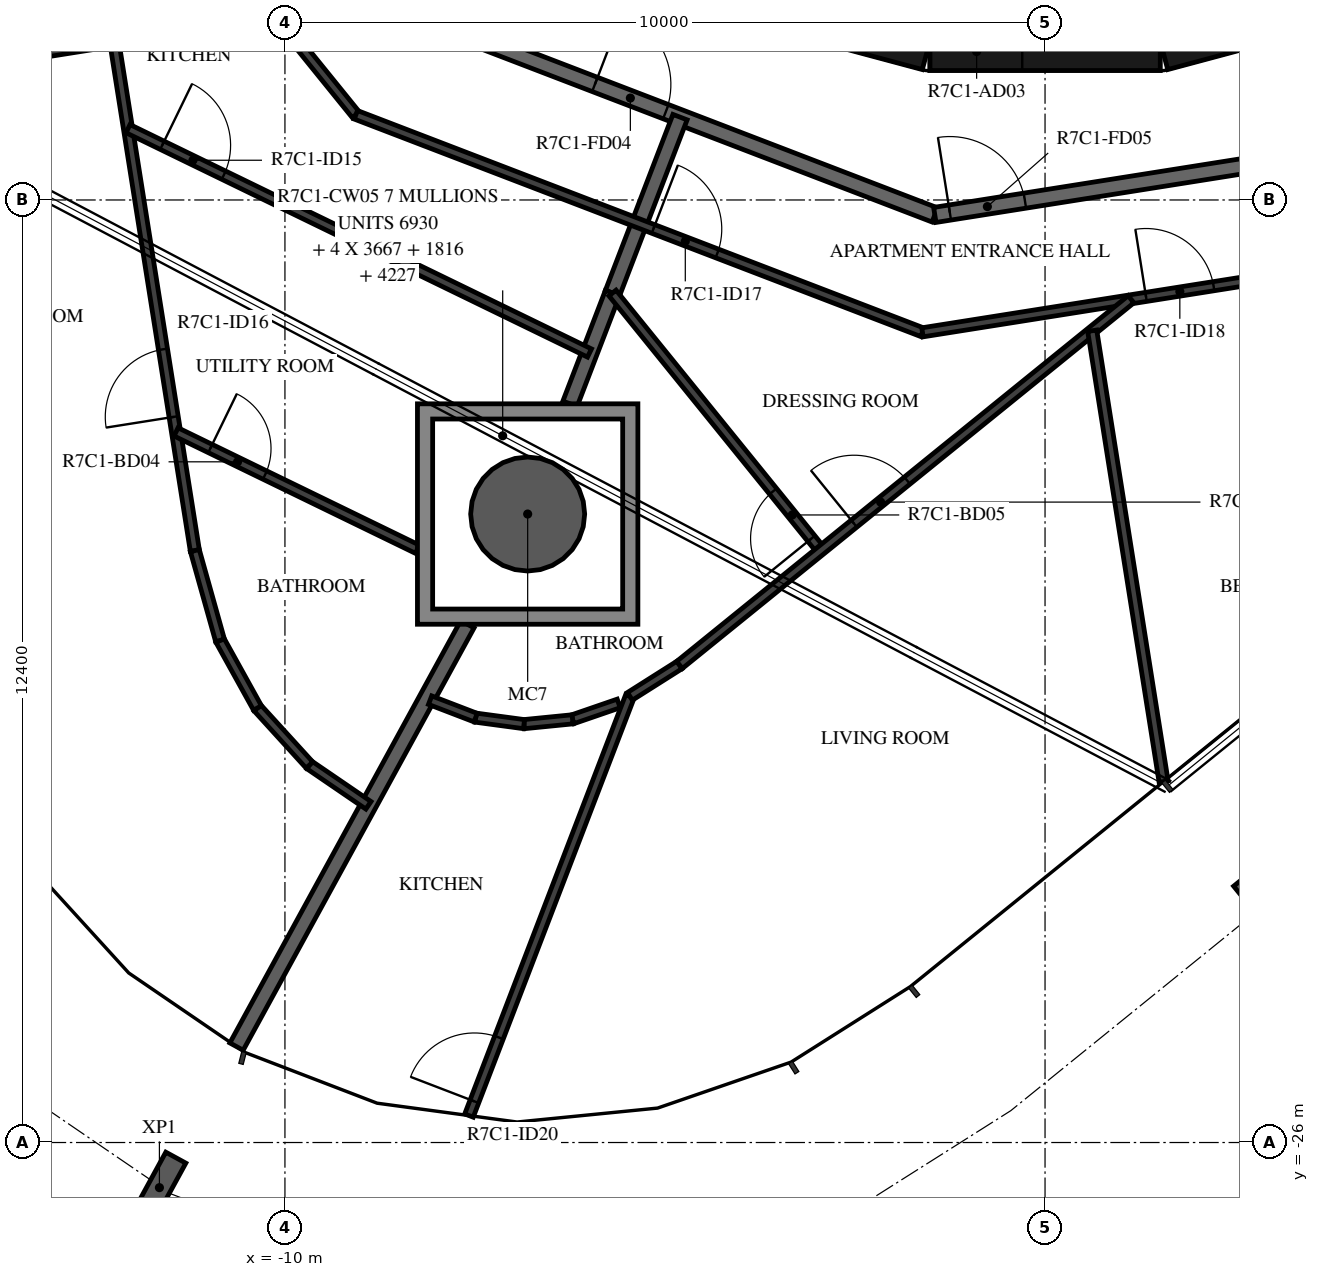
"""IFC4 building model, lengths in metres.
Left out: names, types, materials, properties, quantities, classifications, styles, units other than length and angle.
Written with IfcOpenShell. Run it as: python <this file> out.ifc"""

import sys

from ifc_helpers import new_model, si_unit, direction, frame, frame_2d, origin, origin_2d, place, context, subcontext, project, spatial, polyline, rectangle, hollow_circle, i_section, outline, extrude, element, fill, save


model = new_model("IFC4")
c1 = context("Model", 3, precision=1e-05, world=origin(), true_north=direction((0.0, 1.0)))
c2 = subcontext(c1, "Body", "Model", "MODEL_VIEW")
j1 = project(units=[si_unit("LENGTHUNIT", "METRE"), si_unit("PLANEANGLEUNIT", "RADIAN")], contexts=[c1])
p1 = place(None, origin())
s1 = spatial("IfcSite", under=j1, at=p1, CompositionType="ELEMENT")
p2 = place(p1, origin())
s2 = spatial("IfcBuilding", under=s1, at=p2, CompositionType="ELEMENT")
p3 = place(p2, frame((0.0, 0.0, 287.9)))
s3 = spatial("IfcBuildingStorey", under=s2, at=p3, CompositionType="ELEMENT", Elevation=287.9)
p4 = place(p3, frame((-6.807, -17.732, -0.38), z_axis=(0.0, 0.0, 1.0), x_axis=(1.0, 0.0, 0.0)))
e1 = element("IfcColumn", 1, at=p4, inside=s3, PredefinedType="COLUMN", context=c2, shape_type="SweptSolid", body=[
    extrude(hollow_circle(Radius=0.75, WallThickness=0.035, at=origin_2d()), origin(), (0.0, 0.0, 1.0), 2.616),
])
for number, where, z_axis, x_axis in (
    (2, (-11.652, -26.594, -0.38), (0.0, 0.0, 1.0), (-0.877, 0.48, 0.0)),
    (3, (2.881, -22.883, -0.38), (0.0, 0.0, 1.0), (-0.777, -0.629, 0.0)),
):
    element("IfcColumn", number, at=place(p3, frame(where, z_axis=z_axis, x_axis=x_axis)), inside=s3, PredefinedType="COLUMN", context=c2, shape_type="SweptSolid", body=[
        extrude(i_section(OverallWidth=0.3, OverallDepth=0.9, WebThickness=0.019, FlangeThickness=0.035, FilletRadius=0.03, at=origin_2d()), origin(), (0.0, 0.0, 1.0), 2.616),
    ])
for number, where, z_axis, x_axis in (
    (4, (1.55, -11.643, 0.0), (0.0, 0.0, 1.0), (0.966, 0.259, 0.0)),
    (5, (-4.479, -10.858, 0.0), (0.0, 0.0, 1.0), (0.966, -0.259, 0.0)),
):
    element("IfcWall", number, at=place(p3, frame(where, z_axis=z_axis, x_axis=x_axis)), inside=s3, PredefinedType="SHEAR", context=c2, shape_type="SweptSolid", body=[
        extrude(rectangle(XDim=3.033, YDim=0.5, at=frame_2d((1.516, 0.0))), origin(), (0.0, 0.0, 1.0), 3.05),
    ])
p5 = place(p3, frame((-1.516, -11.647, 0.0), z_axis=(0.0, 0.0, 1.0), x_axis=(1.0, 0.0, 0.0)))
e6 = element("IfcWall", 6, at=p5, inside=s3, PredefinedType="SHEAR", context=c2, shape_type="SweptSolid", body=[
    extrude(rectangle(XDim=3.033, YDim=0.5, at=frame_2d((1.516, 0.0))), origin(), (0.0, 0.0, 1.0), 3.05),
])
p6 = place(p5, frame((0.016, 0.0, 0.0)))
e7 = element("IfcOpeningElement", 7, at=p6, cuts=e6, PredefinedType="OPENING", context=c2, shape_type="SweptSolid", body=[
    extrude(rectangle(XDim=1.2, YDim=2.1, at=frame_2d((0.6, 1.05))), frame((0.0, 0.26, 0.0), z_axis=(0.0, -1.0, 0.0), x_axis=(1.0, 0.0, 0.0)), (0.0, 0.0, 1.0), 0.52),
])
p7 = place(p3, frame((-8.154, -11.223, 0.0), z_axis=(0.0, 0.0, 1.0), x_axis=(0.93359073609, -0.358341090983, 0.0)))
e8 = element("IfcWall", 8, at=p7, inside=s3, PredefinedType="STANDARD", context=c2, shape_type="SweptSolid", body=[
    extrude(rectangle(XDim=7.181, YDim=0.2, at=frame_2d((3.59, 0.0))), origin(), (0.0, 0.0, 1.0), 3.05),
])
p8 = place(p7, frame((2.39, 0.0, 0.0)))
e9 = element("IfcOpeningElement", 9, at=p8, cuts=e8, PredefinedType="OPENING", context=c2, shape_type="SweptSolid", body=[
    extrude(rectangle(XDim=1.0, YDim=2.1, at=frame_2d((0.5, 1.05))), frame((0.0, 0.11, 0.0), z_axis=(0.0, -1.0, 0.0), x_axis=(1.0, 0.0, 0.0)), (0.0, 0.0, 1.0), 0.22),
])
p9 = place(p3, frame((-1.45, -13.797, 0.0), z_axis=(0.0, 0.0, 1.0), x_axis=(0.987690361611, 0.156421704315, 0.0)))
e10 = element("IfcWall", 10, at=p9, inside=s3, PredefinedType="STANDARD", context=c2, shape_type="SweptSolid", body=[
    extrude(rectangle(XDim=7.181, YDim=0.2, at=frame_2d((3.591, 0.0))), origin(), (0.0, 0.0, 1.0), 3.05),
])
p10 = place(p9, frame((0.2, 0.0, 0.0)))
e11 = element("IfcOpeningElement", 11, at=p10, cuts=e10, PredefinedType="OPENING", context=c2, shape_type="SweptSolid", body=[
    extrude(rectangle(XDim=1.0, YDim=2.1, at=frame_2d((0.5, 1.05))), frame((0.0, 0.11, 0.0), z_axis=(0.0, -1.0, 0.0), x_axis=(1.0, 0.0, 0.0)), (0.0, 0.0, 1.0), 0.22),
])
p11 = place(p3, frame((-5.69, -14.824, 0.0), z_axis=(0.0, 0.0, 1.0), x_axis=(0.358345342952, 0.933589104041, 0.0)))
e12 = element("IfcWall", 12, at=p11, inside=s3, PredefinedType="STANDARD", context=c2, shape_type="SweptSolid", body=[
    extrude(rectangle(XDim=2.479, YDim=0.2, at=frame_2d((1.239, 0.0))), origin(), (0.0, 0.0, 1.0), 3.05),
])
p12 = place(p3, frame((-6.25, -16.282, 0.0), z_axis=(0.0, 0.0, 1.0), x_axis=(0.358360842469, 0.933583154617, 0.0)))
e13 = element("IfcWall", 13, at=p12, inside=s3, PredefinedType="STANDARD", context=c2, shape_type="SweptSolid", body=[
    extrude(rectangle(XDim=1.562, YDim=0.2, at=frame_2d((0.781, 0.0))), origin(), (0.0, 0.0, 1.0), 3.05),
])
p13 = place(p3, frame((-10.637, -24.738, 0.0), z_axis=(0.0, 0.0, 1.0), x_axis=(0.479683887596, 0.877441375808, 0.0)))
e14 = element("IfcWall", 14, at=p13, inside=s3, PredefinedType="STANDARD", context=c2, shape_type="SweptSolid", body=[
    extrude(rectangle(XDim=6.333, YDim=0.2, at=frame_2d((3.166, 0.0))), origin(), (0.0, 0.0, 1.0), 3.05),
])
p14 = place(p3, frame((-11.795, -9.111, 0.0), z_axis=(0.0, 0.0, 1.0), x_axis=(0.62936834401, -0.777107127466, 0.0)))
e15 = element("IfcWall", 15, at=p14, inside=s3, PredefinedType="PARTITIONING", context=c2, shape_type="SweptSolid", body=[
    extrude(rectangle(XDim=4.334, YDim=0.12, at=frame_2d((2.167, 0.0))), origin(), (0.0, 0.0, 1.0), 3.05),
])
p15 = place(p14, frame((0.2, 0.0, 0.0)))
e16 = element("IfcOpeningElement", 16, at=p15, cuts=e15, PredefinedType="OPENING", context=c2, shape_type="SweptSolid", body=[
    extrude(rectangle(XDim=0.9, YDim=2.1, at=frame_2d((0.45, 1.05))), frame((0.0, 0.07, 0.0), z_axis=(0.0, -1.0, 0.0), x_axis=(1.0, 0.0, 0.0)), (0.0, 0.0, 1.0), 0.14),
])
p16 = place(p3, frame((-9.067, -12.479, 0.0), z_axis=(0.0, 0.0, 1.0), x_axis=(0.933579449035, -0.358370495911, 0.0)))
e17 = element("IfcWall", 17, at=p16, inside=s3, PredefinedType="PARTITIONING", context=c2, shape_type="SweptSolid", body=[
    extrude(rectangle(XDim=7.985, YDim=0.12, at=frame_2d((3.992, 0.0))), origin(), (0.0, 0.0, 1.0), 3.05),
])
p17 = place(p16, frame((4.192, 0.0, 0.0)))
e18 = element("IfcOpeningElement", 18, at=p17, cuts=e17, PredefinedType="OPENING", context=c2, shape_type="SweptSolid", body=[
    extrude(rectangle(XDim=0.9, YDim=2.1, at=frame_2d((0.45, 1.05))), frame((0.0, 0.07, 0.0), z_axis=(0.0, -1.0, 0.0), x_axis=(1.0, 0.0, 0.0)), (0.0, 0.0, 1.0), 0.14),
])
p18 = place(p3, frame((-11.185, -18.213, 0.0), z_axis=(0.0, 0.0, 1.0), x_axis=(-0.15642108221, 0.987690460134, 0.0)))
e19 = element("IfcWall", 19, at=p18, inside=s3, PredefinedType="PARTITIONING", context=c2, shape_type="SweptSolid", body=[
    extrude(rectangle(XDim=9.132, YDim=0.12, at=frame_2d((4.566, 0.0))), origin(), (0.0, 0.0, 1.0), 3.05),
])
p19 = place(p18, frame((1.781, 0.0, 0.0)))
e20 = element("IfcOpeningElement", 20, at=p19, cuts=e19, PredefinedType="OPENING", context=c2, shape_type="SweptSolid", body=[
    extrude(rectangle(XDim=0.9, YDim=2.1, at=frame_2d((0.45, 1.05))), frame((0.0, 0.07, 0.0), z_axis=(0.0, -1.0, 0.0), x_axis=(1.0, 0.0, 0.0)), (0.0, 0.0, 1.0), 0.14),
])
p20 = place(p3, frame((-15.802, -12.08, 0.0), z_axis=(0.0, 0.0, 1.0), x_axis=(0.987685312069, 0.156453585206, 0.0)))
e21 = element("IfcWall", 21, at=p20, inside=s3, PredefinedType="PARTITIONING", context=c2, shape_type="SweptSolid", body=[
    extrude(rectangle(XDim=3.6, YDim=0.12, at=frame_2d((1.8, 0.0))), origin(), (0.0, 0.0, 1.0), 3.05),
])
p21 = place(p3, frame((-12.064, -12.662, 0.0), z_axis=(0.0, 0.0, 1.0), x_axis=(0.899383852228, -0.437159794985, 0.0)))
e22 = element("IfcWall", 22, at=p21, inside=s3, PredefinedType="PARTITIONING", context=c2, shape_type="SweptSolid", body=[
    extrude(rectangle(XDim=6.75, YDim=0.12, at=frame_2d((3.375, 0.0))), origin(), (0.0, 0.0, 1.0), 3.05),
])
p22 = place(p21, frame((0.5, 0.0, 0.0)))
e23 = element("IfcOpeningElement", 23, at=p22, cuts=e22, PredefinedType="OPENING", context=c2, shape_type="SweptSolid", body=[
    extrude(rectangle(XDim=0.9, YDim=2.1, at=frame_2d((0.45, 1.05))), frame((0.0, 0.07, 0.0), z_axis=(0.0, -1.0, 0.0), x_axis=(1.0, 0.0, 0.0)), (0.0, 0.0, 1.0), 0.14),
])
p23 = place(p3, frame((-8.902, -21.564, 0.0), z_axis=(0.0, 0.0, 1.0), x_axis=(-0.825676933813, 0.56414324508, 0.0)))
e24 = element("IfcWall", 24, at=p23, inside=s3, PredefinedType="PARTITIONING", context=c2, shape_type="SweptSolid", body=[
    extrude(rectangle(XDim=0.939, YDim=0.12, at=frame_2d((0.47, 0.0))), origin(), (0.0, 0.0, 1.0), 3.05),
])
for number, where, z_axis, x_axis in (
    (25, (-9.677, -21.034, 0.0), (0.0, 0.0, 1.0), (-0.674, 0.739, 0.0)),
    (26, (-10.361, -20.283, 0.0), (0.0, 0.0, 1.0), (-0.485, 0.875, 0.0)),
):
    element("IfcWall", number, at=place(p3, frame(where, z_axis=z_axis, x_axis=x_axis)), inside=s3, PredefinedType="PARTITIONING", context=c2, shape_type="SweptSolid", body=[
        extrude(rectangle(XDim=1.016, YDim=0.12, at=frame_2d((0.508, 0.0))), origin(), (0.0, 0.0, 1.0), 3.05),
    ])
p24 = place(p3, frame((-10.854, -19.394, 0.0), z_axis=(0.0, 0.0, 1.0), x_axis=(-0.27001369034, 0.96285648309, 0.0)))
e27 = element("IfcWall", 27, at=p24, inside=s3, PredefinedType="PARTITIONING", context=c2, shape_type="SweptSolid", body=[
    extrude(rectangle(XDim=1.227, YDim=0.12, at=frame_2d((0.614, 0.0))), origin(), (0.0, 0.0, 1.0), 3.05),
])
p25 = place(p3, frame((-11.433, -16.651, 0.0), z_axis=(0.0, 0.0, 1.0), x_axis=(0.899390128806, -0.437146881731, 0.0)))
e28 = element("IfcWall", 28, at=p25, inside=s3, PredefinedType="PARTITIONING", context=c2, shape_type="SweptSolid", body=[
    extrude(rectangle(XDim=3.531, YDim=0.12, at=frame_2d((1.766, 0.0))), origin(), (0.0, 0.0, 1.0), 3.05),
])
p26 = place(p25, frame((0.5, 0.0, 0.0)))
e29 = element("IfcOpeningElement", 29, at=p26, cuts=e28, PredefinedType="OPENING", context=c2, shape_type="SweptSolid", body=[
    extrude(rectangle(XDim=0.8, YDim=2.1, at=frame_2d((0.4, 1.05))), frame((0.0, 0.07, 0.0), z_axis=(0.0, -1.0, 0.0), x_axis=(1.0, 0.0, 0.0)), (0.0, 0.0, 1.0), 0.14),
])
p27 = place(p3, frame((-1.612, -15.341, 0.0), z_axis=(0.0, 0.0, 1.0), x_axis=(0.987687560018, 0.15643939333, 0.0)))
e30 = element("IfcWall", 30, at=p27, inside=s3, PredefinedType="PARTITIONING", context=c2, shape_type="SweptSolid", body=[
    extrude(rectangle(XDim=7.914, YDim=0.12, at=frame_2d((3.957, 0.0))), origin(), (0.0, 0.0, 1.0), 3.05),
])
p28 = place(p27, frame((2.978, 0.0, 0.0)))
e31 = element("IfcOpeningElement", 31, at=p28, cuts=e30, PredefinedType="OPENING", context=c2, shape_type="SweptSolid", body=[
    extrude(rectangle(XDim=0.9, YDim=2.1, at=frame_2d((0.45, 1.05))), frame((0.0, 0.07, 0.0), z_axis=(0.0, -1.0, 0.0), x_axis=(1.0, 0.0, 0.0)), (0.0, 0.0, 1.0), 0.14),
])
p29 = place(p3, frame((-5.609, -20.223, 0.0), z_axis=(0.0, 0.0, 1.0), x_axis=(-0.945401267449, -0.325908642882, 0.0)))
e32 = element("IfcWall", 32, at=p29, inside=s3, PredefinedType="PARTITIONING", context=c2, shape_type="SweptSolid", body=[
    extrude(rectangle(XDim=0.642, YDim=0.12, at=frame_2d((0.321, 0.0))), origin(), (0.0, 0.0, 1.0), 3.05),
])
for number, where, z_axis, x_axis in (
    (33, (-6.216, -20.433, 0.0), (0.0, 0.0, 1.0), (-0.995, -0.099, 0.0)),
    (34, (-6.855, -20.496, 0.0), (0.0, 0.0, 1.0), (-0.991, 0.133, 0.0)),
    (35, (-7.491, -20.41, 0.0), (0.0, 0.0, 1.0), (-0.933, 0.359, 0.0)),
):
    element("IfcWall", number, at=place(p3, frame(where, z_axis=z_axis, x_axis=x_axis)), inside=s3, PredefinedType="PARTITIONING", context=c2, shape_type="SweptSolid", body=[
        extrude(rectangle(XDim=0.642, YDim=0.12, at=frame_2d((0.321, 0.0))), origin(), (0.0, 0.0, 1.0), 3.05),
    ])
p30 = place(p3, frame((-7.579, -25.646, 0.0), z_axis=(0.0, 0.0, 1.0), x_axis=(0.358336526264, 0.933592488158, 0.0)))
e36 = element("IfcWall", 36, at=p30, inside=s3, PredefinedType="PARTITIONING", context=c2, shape_type="SweptSolid", body=[
    extrude(rectangle(XDim=5.908, YDim=0.12, at=frame_2d((2.954, 0.0))), origin(), (0.0, 0.0, 1.0), 3.05),
])
p31 = place(p30, frame((0.2, 0.0, 0.0)))
e37 = element("IfcOpeningElement", 37, at=p31, cuts=e36, PredefinedType="OPENING", context=c2, shape_type="SweptSolid", body=[
    extrude(rectangle(XDim=0.9, YDim=2.1, at=frame_2d((0.45, 1.05))), frame((0.0, 0.07, 0.0), z_axis=(0.0, -1.0, 0.0), x_axis=(1.0, 0.0, 0.0)), (0.0, 0.0, 1.0), 0.14),
])
p32 = place(p3, frame((-2.948, -18.21, 0.0), z_axis=(0.0, 0.0, 1.0), x_axis=(-0.629330389268, 0.777137864953, 0.0)))
e38 = element("IfcWall", 38, at=p32, inside=s3, PredefinedType="PARTITIONING", context=c2, shape_type="SweptSolid", body=[
    extrude(rectangle(XDim=4.357, YDim=0.12, at=frame_2d((2.179, 0.0))), origin(), (0.0, 0.0, 1.0), 3.05),
])
p33 = place(p32, frame((0.2, 0.0, 0.0)))
e39 = element("IfcOpeningElement", 39, at=p33, cuts=e38, PredefinedType="OPENING", context=c2, shape_type="SweptSolid", body=[
    extrude(rectangle(XDim=0.8, YDim=2.1, at=frame_2d((0.4, 1.05))), frame((0.0, 0.07, 0.0), z_axis=(0.0, -1.0, 0.0), x_axis=(1.0, 0.0, 0.0)), (0.0, 0.0, 1.0), 0.14),
])
p34 = place(p3, frame((-5.462, -20.13, 0.0), z_axis=(0.0, 0.0, 1.0), x_axis=(0.84494764883, 0.534849016768, 0.0)))
e40 = element("IfcWall", 40, at=p34, inside=s3, PredefinedType="PARTITIONING", context=c2, shape_type="SweptSolid", body=[
    extrude(rectangle(XDim=0.772, YDim=0.12, at=frame_2d((0.386, 0.0))), origin(), (0.0, 0.0, 1.0), 3.05),
])
p35 = place(p3, frame((-4.809, -19.717, 0.0), z_axis=(0.0, 0.0, 1.0), x_axis=(0.777140730041, 0.629326851255, 0.0)))
e41 = element("IfcWall", 41, at=p35, inside=s3, PredefinedType="PARTITIONING", context=c2, shape_type="SweptSolid", body=[
    extrude(rectangle(XDim=7.644, YDim=0.12, at=frame_2d((3.822, 0.0))), origin(), (0.0, 0.0, 1.0), 3.05),
])
p36 = place(p35, frame((2.954, 0.0, 0.0)))
e42 = element("IfcOpeningElement", 42, at=p36, cuts=e41, PredefinedType="OPENING", context=c2, shape_type="SweptSolid", body=[
    extrude(rectangle(XDim=0.9, YDim=2.1, at=frame_2d((0.45, 1.05))), frame((0.0, 0.07, 0.0), z_axis=(0.0, -1.0, 0.0), x_axis=(1.0, 0.0, 0.0)), (0.0, 0.0, 1.0), 0.14),
])
p37 = place(p3, frame((1.56, -21.251, 0.0), z_axis=(0.0, 0.0, 1.0), x_axis=(-0.156421913213, 0.987690328528, 0.0)))
e43 = element("IfcWall", 43, at=p37, inside=s3, PredefinedType="PARTITIONING", context=c2, shape_type="SweptSolid", body=[
    extrude(rectangle(XDim=6.004, YDim=0.12, at=frame_2d((3.002, 0.0))), origin(), (0.0, 0.0, 1.0), 3.05),
])
p38 = place(p3, origin())
e44 = element("IfcWall", 44, at=p38, inside=s3, PredefinedType="STANDARD", context=c2, shape_type="SweptSolid", body=[
    extrude(outline(polyline([(-5.357, -16.282), (-5.357, -19.182), (-8.257, -19.182), (-8.257, -16.282), (-5.357, -16.282)]), holes=[polyline([(-8.057, -18.982), (-5.557, -18.982), (-5.557, -16.482), (-8.057, -16.482), (-8.057, -18.982)])]), origin(), (0.0, 0.0, 1.0), 3.05),
])
p39 = place(p6, origin())
e45 = element("IfcDoor", 45, at=p39, inside=s3, OperationType="SINGLE_SWING_RIGHT", PredefinedType="DOOR", context=c2, shape_type="SweptSolid", body=[
    extrude(rectangle(XDim=1.2, YDim=2.1, at=frame_2d((0.6, 1.05))), frame((0.0, 0.025, 0.0), z_axis=(0.0, -1.0, 0.0), x_axis=(1.0, 0.0, 0.0)), (0.0, 0.0, 1.0), 0.05),
])
fill(e7, e45)
p40 = place(p8, origin())
e46 = element("IfcDoor", 46, at=p40, inside=s3, OperationType="SINGLE_SWING_RIGHT", PredefinedType="DOOR", context=c2, shape_type="SweptSolid", body=[
    extrude(rectangle(XDim=1.0, YDim=2.1, at=frame_2d((0.5, 1.05))), frame((0.0, 0.025, 0.0), z_axis=(0.0, -1.0, 0.0), x_axis=(1.0, 0.0, 0.0)), (0.0, 0.0, 1.0), 0.05),
])
fill(e9, e46)
p41 = place(p22, origin())
e47 = element("IfcDoor", 47, at=p41, inside=s3, OperationType="SINGLE_SWING_RIGHT", PredefinedType="DOOR", context=c2, shape_type="SweptSolid", body=[
    extrude(rectangle(XDim=0.9, YDim=2.1, at=frame_2d((0.45, 1.05))), frame((0.0, 0.025, 0.0), z_axis=(0.0, -1.0, 0.0), x_axis=(1.0, 0.0, 0.0)), (0.0, 0.0, 1.0), 0.05),
])
fill(e23, e47)
p42 = place(p19, origin())
e48 = element("IfcDoor", 48, at=p42, inside=s3, OperationType="SINGLE_SWING_RIGHT", PredefinedType="DOOR", context=c2, shape_type="SweptSolid", body=[
    extrude(rectangle(XDim=0.9, YDim=2.1, at=frame_2d((0.45, 1.05))), frame((0.0, 0.025, 0.0), z_axis=(0.0, -1.0, 0.0), x_axis=(1.0, 0.0, 0.0)), (0.0, 0.0, 1.0), 0.05),
])
fill(e20, e48)
p43 = place(p26, origin())
e49 = element("IfcDoor", 49, at=p43, inside=s3, OperationType="SINGLE_SWING_RIGHT", PredefinedType="DOOR", context=c2, shape_type="SweptSolid", body=[
    extrude(rectangle(XDim=0.8, YDim=2.1, at=frame_2d((0.4, 1.05))), frame((0.0, 0.025, 0.0), z_axis=(0.0, -1.0, 0.0), x_axis=(1.0, 0.0, 0.0)), (0.0, 0.0, 1.0), 0.05),
])
fill(e29, e49)
p44 = place(p10, origin())
e50 = element("IfcDoor", 50, at=p44, inside=s3, OperationType="SINGLE_SWING_LEFT", PredefinedType="DOOR", context=c2, shape_type="SweptSolid", body=[
    extrude(rectangle(XDim=1.0, YDim=2.1, at=frame_2d((0.5, 1.05))), frame((0.0, 0.025, 0.0), z_axis=(0.0, -1.0, 0.0), x_axis=(1.0, 0.0, 0.0)), (0.0, 0.0, 1.0), 0.05),
])
fill(e11, e50)
p45 = place(p17, origin())
e51 = element("IfcDoor", 51, at=p45, inside=s3, OperationType="SINGLE_SWING_RIGHT", PredefinedType="DOOR", context=c2, shape_type="SweptSolid", body=[
    extrude(rectangle(XDim=0.9, YDim=2.1, at=frame_2d((0.45, 1.05))), frame((0.0, 0.025, 0.0), z_axis=(0.0, -1.0, 0.0), x_axis=(1.0, 0.0, 0.0)), (0.0, 0.0, 1.0), 0.05),
])
fill(e18, e51)
p46 = place(p28, origin())
e52 = element("IfcDoor", 52, at=p46, inside=s3, OperationType="SINGLE_SWING_LEFT", PredefinedType="DOOR", context=c2, shape_type="SweptSolid", body=[
    extrude(rectangle(XDim=0.9, YDim=2.1, at=frame_2d((0.45, 1.05))), frame((0.0, 0.025, 0.0), z_axis=(0.0, -1.0, 0.0), x_axis=(1.0, 0.0, 0.0)), (0.0, 0.0, 1.0), 0.05),
])
fill(e31, e52)
p47 = place(p33, origin())
e53 = element("IfcDoor", 53, at=p47, inside=s3, OperationType="SINGLE_SWING_LEFT", PredefinedType="DOOR", context=c2, shape_type="SweptSolid", body=[
    extrude(rectangle(XDim=0.8, YDim=2.1, at=frame_2d((0.4, 1.05))), frame((0.0, 0.025, 0.0), z_axis=(0.0, -1.0, 0.0), x_axis=(1.0, 0.0, 0.0)), (0.0, 0.0, 1.0), 0.05),
])
fill(e39, e53)
p48 = place(p36, origin())
e54 = element("IfcDoor", 54, at=p48, inside=s3, OperationType="SINGLE_SWING_LEFT", PredefinedType="DOOR", context=c2, shape_type="SweptSolid", body=[
    extrude(rectangle(XDim=0.9, YDim=2.1, at=frame_2d((0.45, 1.05))), frame((0.0, 0.025, 0.0), z_axis=(0.0, -1.0, 0.0), x_axis=(1.0, 0.0, 0.0)), (0.0, 0.0, 1.0), 0.05),
])
fill(e42, e54)
p49 = place(p31, origin())
e55 = element("IfcDoor", 55, at=p49, inside=s3, OperationType="SINGLE_SWING_LEFT", PredefinedType="DOOR", context=c2, shape_type="SweptSolid", body=[
    extrude(rectangle(XDim=0.9, YDim=2.1, at=frame_2d((0.45, 1.05))), frame((0.0, 0.025, 0.0), z_axis=(0.0, -1.0, 0.0), x_axis=(1.0, 0.0, 0.0)), (0.0, 0.0, 1.0), 0.05),
])
fill(e37, e55)
save(model, sys.argv[1])
